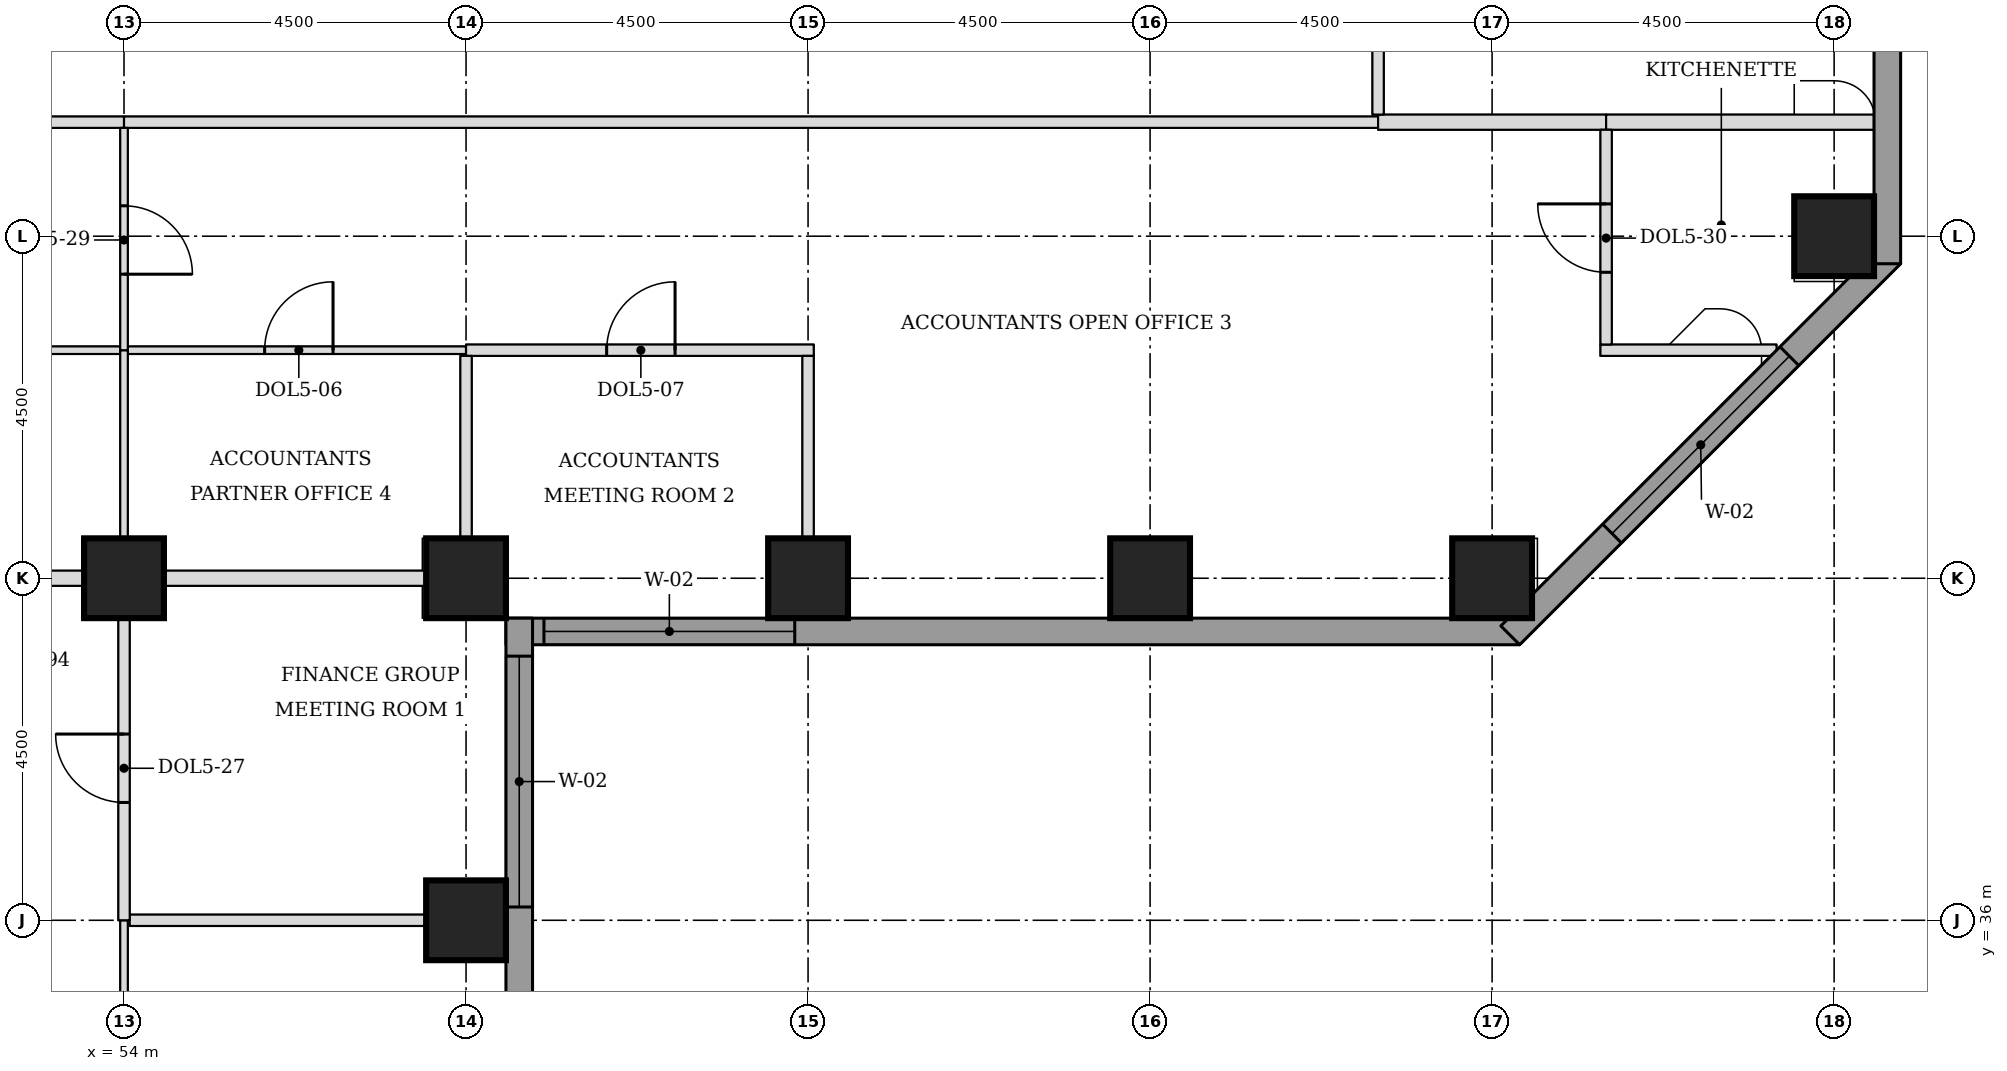
"""IFC4 building model, lengths in metres.
Left out: names, types, materials, properties, quantities, classifications, styles, units other than length and angle.
Written with IfcOpenShell. Run it as: python <this file> out.ifc"""

import sys

from ifc_helpers import new_model, si_unit, direction, frame, frame_2d, origin, origin_2d, place, context, subcontext, project, spatial, rectangle, extrude, element, fill, save


model = new_model("IFC4")
c1 = context("Model", 3, precision=1e-05, world=origin(), true_north=direction((0.0, 1.0)))
c2 = subcontext(c1, "Body", "Model", "MODEL_VIEW")
j1 = project(units=[si_unit("LENGTHUNIT", "METRE"), si_unit("PLANEANGLEUNIT", "RADIAN")], contexts=[c1])
p1 = place(None, origin())
s1 = spatial("IfcSite", under=j1, at=p1, CompositionType="ELEMENT")
p2 = place(p1, origin())
s2 = spatial("IfcBuilding", under=s1, at=p2, CompositionType="ELEMENT")
p3 = place(p2, frame((0.0, 0.0, 108.5)))
s3 = spatial("IfcBuildingStorey", under=s2, at=p3, CompositionType="ELEMENT", Elevation=108.5)
for number, where, z_axis, x_axis in (
    (1, (58.5, 36.0, 0.0), (0.0, 0.0, 1.0), (1.0, 0.0, 0.0)),
    (2, (54.0, 40.5, 0.0), (0.0, 0.0, 1.0), (1.0, 0.0, 0.0)),
    (3, (58.5, 40.5, 0.0), (0.0, 0.0, 1.0), (1.0, 0.0, 0.0)),
    (4, (63.0, 40.5, 0.0), (0.0, 0.0, 1.0), (1.0, 0.0, 0.0)),
    (5, (67.5, 40.5, 0.0), (0.0, 0.0, 1.0), (1.0, 0.0, 0.0)),
    (6, (72.0, 40.5, 0.0), (0.0, 0.0, 1.0), (1.0, 0.0, 0.0)),
    (7, (76.5, 45.0, 0.0), (0.0, 0.0, 1.0), (1.0, 0.0, 0.0)),
):
    element("IfcColumn", number, at=place(p3, frame(where, z_axis=z_axis, x_axis=x_axis)), inside=s3, PredefinedType="COLUMN", context=c2, shape_type="SweptSolid", body=[
        extrude(rectangle(XDim=1.05, YDim=1.05, at=origin_2d()), origin(), (0.0, 0.0, 1.0), 3.7),
    ])
p4 = place(p3, frame((59.025, 39.8, 0.0), z_axis=(0.0, 0.0, 1.0), x_axis=(1.0, 0.0, 0.0)))
e8 = element("IfcWall", 8, at=p4, inside=s3, PredefinedType="STANDARD", context=c2, shape_type="SweptSolid", body=[
    extrude(rectangle(XDim=13.337, YDim=0.35, at=frame_2d((6.669, 0.0))), origin(), (0.0, 0.0, 1.0), 3.525),
])
p5 = place(p4, frame((0.5, 0.0, 0.9)))
e9 = element("IfcOpeningElement", 9, at=p5, cuts=e8, PredefinedType="OPENING", context=c2, shape_type="SweptSolid", body=[
    extrude(rectangle(XDim=3.3, YDim=1.9, at=frame_2d((1.65, 0.95))), frame((0.0, 0.185, 0.0), z_axis=(0.0, -1.0, 0.0), x_axis=(1.0, 0.0, 0.0)), (0.0, 0.0, 1.0), 0.37),
])
p6 = place(p3, frame((72.239, 39.749, 0.0), z_axis=(0.0, 0.0, 1.0), x_axis=(0.707106781187, 0.707106781187, 0.0)))
e10 = element("IfcWall", 10, at=p6, inside=s3, PredefinedType="STANDARD", context=c2, shape_type="SweptSolid", body=[
    extrude(rectangle(XDim=7.089, YDim=0.35, at=frame_2d((3.544, 0.0))), origin(), (0.0, 0.0, 1.0), 3.525),
])
p7 = place(p6, frame((1.894, 0.0, 0.9)))
e11 = element("IfcOpeningElement", 11, at=p7, cuts=e10, PredefinedType="OPENING", context=c2, shape_type="SweptSolid", body=[
    extrude(rectangle(XDim=3.3, YDim=1.9, at=frame_2d((1.65, 0.95))), frame((0.0, 0.185, 0.0), z_axis=(0.0, -1.0, 0.0), x_axis=(1.0, 0.0, 0.0)), (0.0, 0.0, 1.0), 0.37),
])
p8 = place(p3, frame((77.2, 44.638, 0.0), z_axis=(0.0, 0.0, 1.0), x_axis=(0.0, 1.0, 0.0)))
e12 = element("IfcWall", 12, at=p8, inside=s3, PredefinedType="STANDARD", context=c2, shape_type="SweptSolid", body=[
    extrude(rectangle(XDim=32.225, YDim=0.35, at=frame_2d((16.112, 0.0))), origin(), (0.0, 0.0, 1.0), 3.525),
])
p9 = place(p8, frame((5.462, 0.0, 0.9)))
e13 = element("IfcOpeningElement", 13, at=p9, cuts=e12, PredefinedType="OPENING", context=c2, shape_type="SweptSolid", body=[
    extrude(rectangle(XDim=3.3, YDim=1.9, at=frame_2d((1.65, 0.95))), frame((0.0, 0.185, 0.0), z_axis=(0.0, -1.0, 0.0), x_axis=(1.0, 0.0, 0.0)), (0.0, 0.0, 1.0), 0.37),
])
p10 = place(p8, frame((9.962, 0.0, 0.9)))
e14 = element("IfcOpeningElement", 14, at=p10, cuts=e12, PredefinedType="OPENING", context=c2, shape_type="SweptSolid", body=[
    extrude(rectangle(XDim=3.3, YDim=1.9, at=frame_2d((1.65, 0.95))), frame((0.0, 0.185, 0.0), z_axis=(0.0, -1.0, 0.0), x_axis=(1.0, 0.0, 0.0)), (0.0, 0.0, 1.0), 0.37),
])
p11 = place(p8, frame((14.462, 0.0, 0.9)))
e15 = element("IfcOpeningElement", 15, at=p11, cuts=e12, PredefinedType="OPENING", context=c2, shape_type="SweptSolid", body=[
    extrude(rectangle(XDim=3.3, YDim=1.9, at=frame_2d((1.65, 0.95))), frame((0.0, 0.185, 0.0), z_axis=(0.0, -1.0, 0.0), x_axis=(1.0, 0.0, 0.0)), (0.0, 0.0, 1.0), 0.37),
])
p12 = place(p8, frame((18.962, 0.0, 0.9)))
e16 = element("IfcOpeningElement", 16, at=p12, cuts=e12, PredefinedType="OPENING", context=c2, shape_type="SweptSolid", body=[
    extrude(rectangle(XDim=3.3, YDim=1.9, at=frame_2d((1.65, 0.95))), frame((0.0, 0.185, 0.0), z_axis=(0.0, -1.0, 0.0), x_axis=(1.0, 0.0, 0.0)), (0.0, 0.0, 1.0), 0.37),
])
p13 = place(p8, frame((23.462, 0.0, 0.9)))
e17 = element("IfcOpeningElement", 17, at=p13, cuts=e12, PredefinedType="OPENING", context=c2, shape_type="SweptSolid", body=[
    extrude(rectangle(XDim=3.3, YDim=1.9, at=frame_2d((1.65, 0.95))), frame((0.0, 0.185, 0.0), z_axis=(0.0, -1.0, 0.0), x_axis=(1.0, 0.0, 0.0)), (0.0, 0.0, 1.0), 0.37),
])
p14 = place(p3, frame((59.2, 22.138, 0.0), z_axis=(0.0, 0.0, 1.0), x_axis=(0.0, 1.0, 0.0)))
e18 = element("IfcWall", 18, at=p14, inside=s3, PredefinedType="STANDARD", context=c2, shape_type="SweptSolid", body=[
    extrude(rectangle(XDim=17.837, YDim=0.35, at=frame_2d((8.919, 0.0))), origin(), (0.0, 0.0, 1.0), 3.525),
])
p15 = place(p14, frame((5.462, 0.0, 0.9)))
e19 = element("IfcOpeningElement", 19, at=p15, cuts=e18, PredefinedType="OPENING", context=c2, shape_type="SweptSolid", body=[
    extrude(rectangle(XDim=3.3, YDim=1.9, at=frame_2d((1.65, 0.95))), frame((0.0, 0.185, 0.0), z_axis=(0.0, -1.0, 0.0), x_axis=(1.0, 0.0, 0.0)), (0.0, 0.0, 1.0), 0.37),
])
p16 = place(p14, frame((14.037, 0.0, 0.9)))
e20 = element("IfcOpeningElement", 20, at=p16, cuts=e18, PredefinedType="OPENING", context=c2, shape_type="SweptSolid", body=[
    extrude(rectangle(XDim=3.3, YDim=1.9, at=frame_2d((1.65, 0.95))), frame((0.0, 0.185, 0.0), z_axis=(0.0, -1.0, 0.0), x_axis=(1.0, 0.0, 0.0)), (0.0, 0.0, 1.0), 0.37),
])
p17 = place(p3, frame((54.075, 36.0, 0.0), z_axis=(0.0, 0.0, 1.0), x_axis=(1.0, 0.0, 0.0)))
e21 = element("IfcWall", 21, at=p17, inside=s3, PredefinedType="PARTITIONING", context=c2, shape_type="SweptSolid", body=[
    extrude(rectangle(XDim=4.95, YDim=0.15, at=frame_2d((2.475, 0.0))), origin(), (0.0, 0.0, 1.0), 3.096),
])
p18 = place(p3, frame((50.015, 40.5, 0.0), z_axis=(0.0, 0.0, 1.0), x_axis=(1.0, 0.0, 0.0)))
e22 = element("IfcWall", 22, at=p18, inside=s3, PredefinedType="PARTITIONING", context=c2, shape_type="SweptSolid", body=[
    extrude(rectangle(XDim=3.46, YDim=0.2, at=frame_2d((1.73, 0.0))), origin(), (0.0, 0.0, 1.0), 2.8),
])
p19 = place(p3, frame((54.495, 40.5, 0.0), z_axis=(0.0, 0.0, 1.0), x_axis=(1.0, 0.0, 0.0)))
e23 = element("IfcWall", 23, at=p19, inside=s3, PredefinedType="PARTITIONING", context=c2, shape_type="SweptSolid", body=[
    extrude(rectangle(XDim=3.48, YDim=0.2, at=frame_2d((1.74, 0.0))), origin(), (0.0, 0.0, 1.0), 2.8),
])
p20 = place(p3, frame((49.575, 43.5, 0.0), z_axis=(0.0, 0.0, 1.0), x_axis=(1.0, 0.0, 0.0)))
e24 = element("IfcWall", 24, at=p20, inside=s3, PredefinedType="PARTITIONING", context=c2, shape_type="SweptSolid", body=[
    extrude(rectangle(XDim=4.375, YDim=0.1, at=frame_2d((2.188, 0.0))), origin(), (0.0, 0.0, 1.0), 3.55),
])
p21 = place(p20, frame((1.75, 0.0, 0.0)))
e25 = element("IfcOpeningElement", 25, at=p21, cuts=e24, PredefinedType="OPENING", context=c2, shape_type="SweptSolid", body=[
    extrude(rectangle(XDim=0.9, YDim=2.1, at=frame_2d((0.45, 1.05))), frame((0.0, 0.06, 0.0), z_axis=(0.0, -1.0, 0.0), x_axis=(1.0, 0.0, 0.0)), (0.0, 0.0, 1.0), 0.12),
])
p22 = place(p3, frame((54.05, 43.5, 0.0), z_axis=(0.0, 0.0, 1.0), x_axis=(1.0, 0.0, 0.0)))
e26 = element("IfcWall", 26, at=p22, inside=s3, PredefinedType="PARTITIONING", context=c2, shape_type="SweptSolid", body=[
    extrude(rectangle(XDim=4.45, YDim=0.1, at=frame_2d((2.225, 0.0))), origin(), (0.0, 0.0, 1.0), 3.55),
])
p23 = place(p22, frame((1.8, 0.0, 0.0)))
e27 = element("IfcOpeningElement", 27, at=p23, cuts=e26, PredefinedType="OPENING", context=c2, shape_type="SweptSolid", body=[
    extrude(rectangle(XDim=0.9, YDim=2.1, at=frame_2d((0.45, 1.05))), frame((0.0, 0.06, 0.0), z_axis=(0.0, -1.0, 0.0), x_axis=(1.0, 0.0, 0.0)), (0.0, 0.0, 1.0), 0.12),
])
p24 = place(p3, frame((58.5, 43.5, 0.0), z_axis=(0.0, 0.0, 1.0), x_axis=(1.0, 0.0, 0.0)))
e28 = element("IfcWall", 28, at=p24, inside=s3, PredefinedType="PARTITIONING", context=c2, shape_type="SweptSolid", body=[
    extrude(rectangle(XDim=4.575, YDim=0.15, at=frame_2d((2.288, 0.0))), origin(), (0.0, 0.0, 1.0), 3.55),
])
p25 = place(p24, frame((1.85, 0.0, 0.0)))
e29 = element("IfcOpeningElement", 29, at=p25, cuts=e28, PredefinedType="OPENING", context=c2, shape_type="SweptSolid", body=[
    extrude(rectangle(XDim=0.9, YDim=2.1, at=frame_2d((0.45, 1.05))), frame((0.0, 0.085, 0.0), z_axis=(0.0, -1.0, 0.0), x_axis=(1.0, 0.0, 0.0)), (0.0, 0.0, 1.0), 0.17),
])
p26 = place(p3, frame((73.425, 43.5, 0.0), z_axis=(0.0, 0.0, 1.0), x_axis=(1.0, 0.0, 0.0)))
e30 = element("IfcWall", 30, at=p26, inside=s3, PredefinedType="PARTITIONING", context=c2, shape_type="SweptSolid", body=[
    extrude(rectangle(XDim=2.317, YDim=0.15, at=frame_2d((1.159, 0.0))), origin(), (0.0, 0.0, 1.0), 3.55),
])
p27 = place(p3, frame((49.425, 46.5, 0.0), z_axis=(0.0, 0.0, 1.0), x_axis=(1.0, 0.0, 0.0)))
e31 = element("IfcWall", 31, at=p27, inside=s3, PredefinedType="PARTITIONING", context=c2, shape_type="SweptSolid", body=[
    extrude(rectangle(XDim=4.575, YDim=0.15, at=frame_2d((2.288, 0.0))), origin(), (0.0, 0.0, 1.0), 3.55),
])
p28 = place(p27, frame((1.8, 0.0, 0.0)))
e32 = element("IfcOpeningElement", 32, at=p28, cuts=e31, PredefinedType="OPENING", context=c2, shape_type="SweptSolid", body=[
    extrude(rectangle(XDim=1.0, YDim=2.1, at=frame_2d((0.5, 1.05))), frame((0.0, 0.085, 0.0), z_axis=(0.0, -1.0, 0.0), x_axis=(1.0, 0.0, 0.0)), (0.0, 0.0, 1.0), 0.17),
])
p29 = place(p3, frame((54.0, 46.5, 0.0), z_axis=(0.0, 0.0, 1.0), x_axis=(1.0, 0.0, 0.0)))
e33 = element("IfcWall", 33, at=p29, inside=s3, PredefinedType="PARTITIONING", context=c2, shape_type="SweptSolid", body=[
    extrude(rectangle(XDim=16.5, YDim=0.15, at=frame_2d((8.25, 0.0))), origin(), (0.0, 0.0, 1.0), 3.55),
])
p30 = place(p3, frame((70.5, 46.5, 0.0), z_axis=(0.0, 0.0, 1.0), x_axis=(1.0, 0.0, 0.0)))
e34 = element("IfcWall", 34, at=p30, inside=s3, PredefinedType="PARTITIONING", context=c2, shape_type="SweptSolid", body=[
    extrude(rectangle(XDim=3.0, YDim=0.2, at=frame_2d((1.5, 0.0))), origin(), (0.0, 0.0, 1.0), 3.55),
])
p31 = place(p3, frame((73.5, 46.5, 0.0), z_axis=(0.0, 0.0, 1.0), x_axis=(1.0, 0.0, 0.0)))
e35 = element("IfcWall", 35, at=p31, inside=s3, PredefinedType="PARTITIONING", context=c2, shape_type="SweptSolid", body=[
    extrude(rectangle(XDim=3.525, YDim=0.2, at=frame_2d((1.762, 0.0))), origin(), (0.0, 0.0, 1.0), 3.55),
])
p32 = place(p3, frame((54.0, 31.575, 0.0), z_axis=(0.0, 0.0, 1.0), x_axis=(0.0, 1.0, 0.0)))
e36 = element("IfcWall", 36, at=p32, inside=s3, PredefinedType="PARTITIONING", context=c2, shape_type="SweptSolid", body=[
    extrude(rectangle(XDim=4.425, YDim=0.1, at=frame_2d((2.212, 0.0))), origin(), (0.0, 0.0, 1.0), 3.55),
])
p33 = place(p32, frame((1.75, 0.0, 0.0)))
e37 = element("IfcOpeningElement", 37, at=p33, cuts=e36, PredefinedType="OPENING", context=c2, shape_type="SweptSolid", body=[
    extrude(rectangle(XDim=0.9, YDim=2.1, at=frame_2d((0.45, 1.05))), frame((0.0, 0.06, 0.0), z_axis=(0.0, -1.0, 0.0), x_axis=(1.0, 0.0, 0.0)), (0.0, 0.0, 1.0), 0.12),
])
p34 = place(p3, frame((54.0, 36.0, 0.0), z_axis=(0.0, 0.0, 1.0), x_axis=(0.0, 1.0, 0.0)))
e38 = element("IfcWall", 38, at=p34, inside=s3, PredefinedType="PARTITIONING", context=c2, shape_type="SweptSolid", body=[
    extrude(rectangle(XDim=3.975, YDim=0.15, at=frame_2d((1.988, 0.0))), origin(), (0.0, 0.0, 1.0), 3.55),
])
p35 = place(p34, frame((1.55, 0.0, 0.0)))
e39 = element("IfcOpeningElement", 39, at=p35, cuts=e38, PredefinedType="OPENING", context=c2, shape_type="SweptSolid", body=[
    extrude(rectangle(XDim=0.9, YDim=2.1, at=frame_2d((0.45, 1.05))), frame((0.0, 0.085, 0.0), z_axis=(0.0, -1.0, 0.0), x_axis=(1.0, 0.0, 0.0)), (0.0, 0.0, 1.0), 0.17),
])
p36 = place(p3, frame((63.0, 39.975, 0.0), z_axis=(0.0, 0.0, 1.0), x_axis=(0.0, 1.0, 0.0)))
e40 = element("IfcWall", 40, at=p36, inside=s3, PredefinedType="PARTITIONING", context=c2, shape_type="SweptSolid", body=[
    extrude(rectangle(XDim=3.45, YDim=0.15, at=frame_2d((1.725, 0.0))), origin(), (0.0, 0.0, 1.0), 3.55),
])
p37 = place(p3, frame((54.0, 41.025, 0.0), z_axis=(0.0, 0.0, 1.0), x_axis=(0.0, 1.0, 0.0)))
e41 = element("IfcWall", 41, at=p37, inside=s3, PredefinedType="PARTITIONING", context=c2, shape_type="SweptSolid", body=[
    extrude(rectangle(XDim=2.475, YDim=0.1, at=frame_2d((1.238, 0.0))), origin(), (0.0, 0.0, 1.0), 3.55),
])
p38 = place(p3, frame((58.5, 41.025, 0.0), z_axis=(0.0, 0.0, 1.0), x_axis=(0.0, 1.0, 0.0)))
e42 = element("IfcWall", 42, at=p38, inside=s3, PredefinedType="PARTITIONING", context=c2, shape_type="SweptSolid", body=[
    extrude(rectangle(XDim=2.4, YDim=0.15, at=frame_2d((1.2, 0.0))), origin(), (0.0, 0.0, 1.0), 3.55),
])
p39 = place(p3, frame((54.0, 43.5, 0.0), z_axis=(0.0, 0.0, 1.0), x_axis=(0.0, 1.0, 0.0)))
e43 = element("IfcWall", 43, at=p39, inside=s3, PredefinedType="PARTITIONING", context=c2, shape_type="SweptSolid", body=[
    extrude(rectangle(XDim=2.925, YDim=0.1, at=frame_2d((1.462, 0.0))), origin(), (0.0, 0.0, 1.0), 3.55),
])
p40 = place(p39, frame((1.0, 0.0, 0.0)))
e44 = element("IfcOpeningElement", 44, at=p40, cuts=e43, PredefinedType="OPENING", context=c2, shape_type="SweptSolid", body=[
    extrude(rectangle(XDim=0.9, YDim=2.1, at=frame_2d((0.45, 1.05))), frame((0.0, 0.06, 0.0), z_axis=(0.0, -1.0, 0.0), x_axis=(1.0, 0.0, 0.0)), (0.0, 0.0, 1.0), 0.12),
])
p41 = place(p3, frame((73.5, 43.575, 0.0), z_axis=(0.0, 0.0, 1.0), x_axis=(0.0, 1.0, 0.0)))
e45 = element("IfcWall", 45, at=p41, inside=s3, PredefinedType="PARTITIONING", context=c2, shape_type="SweptSolid", body=[
    extrude(rectangle(XDim=2.825, YDim=0.15, at=frame_2d((1.413, 0.0))), origin(), (0.0, 0.0, 1.0), 3.55),
])
p42 = place(p41, frame((0.95, 0.0, 0.0)))
e46 = element("IfcOpeningElement", 46, at=p42, cuts=e45, PredefinedType="OPENING", context=c2, shape_type="SweptSolid", body=[
    extrude(rectangle(XDim=0.9, YDim=2.1, at=frame_2d((0.45, 1.05))), frame((0.0, 0.085, 0.0), z_axis=(0.0, -1.0, 0.0), x_axis=(1.0, 0.0, 0.0)), (0.0, 0.0, 1.0), 0.17),
])
p43 = place(p3, frame((70.5, 46.6, 0.0), z_axis=(0.0, 0.0, 1.0), x_axis=(0.0, 1.0, 0.0)))
e47 = element("IfcWall", 47, at=p43, inside=s3, PredefinedType="PARTITIONING", context=c2, shape_type="SweptSolid", body=[
    extrude(rectangle(XDim=4.4, YDim=0.15, at=frame_2d((2.2, 0.0))), origin(), (0.0, 0.0, 1.0), 3.55),
])
p44 = place(p43, frame((1.7, 0.0, 0.0)))
e48 = element("IfcOpeningElement", 48, at=p44, cuts=e47, PredefinedType="OPENING", context=c2, shape_type="SweptSolid", body=[
    extrude(rectangle(XDim=1.0, YDim=2.1, at=frame_2d((0.5, 1.05))), frame((0.0, 0.085, 0.0), z_axis=(0.0, -1.0, 0.0), x_axis=(1.0, 0.0, 0.0)), (0.0, 0.0, 1.0), 0.17),
])
p45 = place(p5, origin())
e49 = element("IfcWindow", 49, at=p45, inside=s3, PartitioningType="SINGLE_PANEL", PredefinedType="WINDOW", context=c2, shape_type="SweptSolid", body=[
    extrude(rectangle(XDim=3.3, YDim=1.9, at=frame_2d((1.65, 0.95))), frame((0.0, 0.085, 0.0), z_axis=(0.0, -1.0, 0.0), x_axis=(1.0, 0.0, 0.0)), (0.0, 0.0, 1.0), 0.06),
])
fill(e9, e49)
p46 = place(p7, origin())
e50 = element("IfcWindow", 50, at=p46, inside=s3, PartitioningType="SINGLE_PANEL", PredefinedType="WINDOW", context=c2, shape_type="SweptSolid", body=[
    extrude(rectangle(XDim=3.3, YDim=1.9, at=frame_2d((1.65, 0.95))), frame((0.0, 0.085, 0.0), z_axis=(0.0, -1.0, 0.0), x_axis=(1.0, 0.0, 0.0)), (0.0, 0.0, 1.0), 0.06),
])
fill(e11, e50)
p47 = place(p16, origin())
e51 = element("IfcWindow", 51, at=p47, inside=s3, PartitioningType="SINGLE_PANEL", PredefinedType="WINDOW", context=c2, shape_type="SweptSolid", body=[
    extrude(rectangle(XDim=3.3, YDim=1.9, at=frame_2d((1.65, 0.95))), frame((0.0, 0.085, 0.0), z_axis=(0.0, -1.0, 0.0), x_axis=(1.0, 0.0, 0.0)), (0.0, 0.0, 1.0), 0.06),
])
fill(e20, e51)
p48 = place(p35, origin())
e52 = element("IfcDoor", 52, at=p48, inside=s3, OperationType="SINGLE_SWING_RIGHT", PredefinedType="DOOR", context=c2, shape_type="SweptSolid", body=[
    extrude(rectangle(XDim=0.9, YDim=2.1, at=frame_2d((0.45, 1.05))), frame((0.0, 0.025, 0.0), z_axis=(0.0, -1.0, 0.0), x_axis=(1.0, 0.0, 0.0)), (0.0, 0.0, 1.0), 0.05),
])
fill(e39, e52)
p49 = place(p40, frame((0.9, 0.0, 0.0), z_axis=(0.0, 0.0, 1.0), x_axis=(-1.0, 0.0, 0.0)))
e53 = element("IfcDoor", 53, at=p49, inside=s3, OperationType="SINGLE_SWING_RIGHT", PredefinedType="DOOR", context=c2, shape_type="SweptSolid", body=[
    extrude(rectangle(XDim=0.9, YDim=2.1, at=frame_2d((0.45, 1.05))), frame((0.0, 0.025, 0.0), z_axis=(0.0, -1.0, 0.0), x_axis=(1.0, 0.0, 0.0)), (0.0, 0.0, 1.0), 0.05),
])
fill(e44, e53)
p50 = place(p23, origin())
e54 = element("IfcDoor", 54, at=p50, inside=s3, OperationType="SINGLE_SWING_RIGHT", PredefinedType="DOOR", context=c2, shape_type="SweptSolid", body=[
    extrude(rectangle(XDim=0.9, YDim=2.1, at=frame_2d((0.45, 1.05))), frame((0.0, 0.025, 0.0), z_axis=(0.0, -1.0, 0.0), x_axis=(1.0, 0.0, 0.0)), (0.0, 0.0, 1.0), 0.05),
])
fill(e27, e54)
p51 = place(p42, origin())
e55 = element("IfcDoor", 55, at=p51, inside=s3, OperationType="SINGLE_SWING_RIGHT", PredefinedType="DOOR", context=c2, shape_type="SweptSolid", body=[
    extrude(rectangle(XDim=0.9, YDim=2.1, at=frame_2d((0.45, 1.05))), frame((0.0, 0.025, 0.0), z_axis=(0.0, -1.0, 0.0), x_axis=(1.0, 0.0, 0.0)), (0.0, 0.0, 1.0), 0.05),
])
fill(e46, e55)
p52 = place(p25, origin())
e56 = element("IfcDoor", 56, at=p52, inside=s3, OperationType="SINGLE_SWING_RIGHT", PredefinedType="DOOR", context=c2, shape_type="SweptSolid", body=[
    extrude(rectangle(XDim=0.9, YDim=2.1, at=frame_2d((0.45, 1.05))), frame((0.0, 0.025, 0.0), z_axis=(0.0, -1.0, 0.0), x_axis=(1.0, 0.0, 0.0)), (0.0, 0.0, 1.0), 0.05),
])
fill(e29, e56)
save(model, sys.argv[1])
